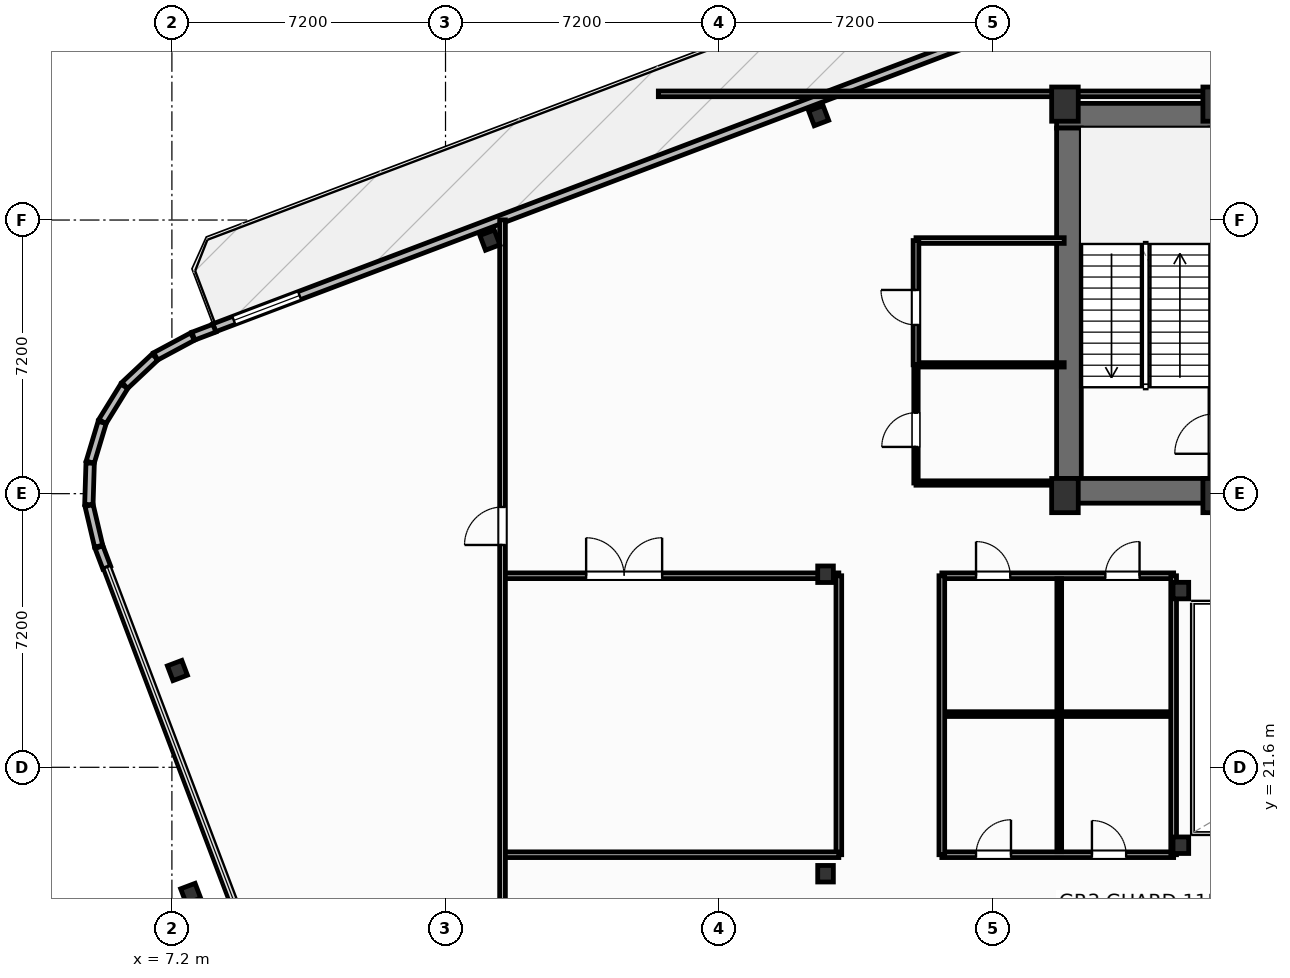
"""IFC4 building model, lengths in metres.
Left out: names, types, materials, properties, quantities, classifications, styles, units other than length and angle.
Written with IfcOpenShell. Run it as: python <this file> out.ifc"""

import sys

from ifc_helpers import new_model, si_unit, direction, frame, frame_2d, origin, origin_2d, place, context, subcontext, project, spatial, rectangle, i_section, extrude, element, fill, save


model = new_model("IFC4")
c1 = context("Model", 3, precision=1e-05, world=origin(), true_north=direction((0.0, 1.0)))
c2 = subcontext(c1, "Body", "Model", "MODEL_VIEW")
j1 = project(units=[si_unit("LENGTHUNIT", "METRE"), si_unit("PLANEANGLEUNIT", "RADIAN")], contexts=[c1])
p1 = place(None, origin())
s1 = spatial("IfcSite", under=j1, at=p1, CompositionType="ELEMENT")
p2 = place(p1, origin())
s2 = spatial("IfcBuilding", under=s1, at=p2, CompositionType="ELEMENT")
p3 = place(p2, frame((0.0, 0.0, 207.9)))
s3 = spatial("IfcBuildingStorey", under=s2, at=p3, CompositionType="ELEMENT", Elevation=207.9)
for number, where, z_axis, x_axis in (
    (1, (30.7, 28.75, 0.0), (0.0, 0.0, 1.0), (1.0, 0.0, 0.0)),
    (2, (34.68, 28.75, 0.0), (0.0, 0.0, 1.0), (1.0, 0.0, 0.0)),
    (3, (30.7, 39.05, 0.0), (0.0, 0.0, 1.0), (1.0, 0.0, 0.0)),
    (4, (34.68, 39.05, 0.0), (0.0, 0.0, 1.0), (1.0, 0.0, 0.0)),
):
    element("IfcColumn", number, at=place(p3, frame(where, z_axis=z_axis, x_axis=x_axis)), inside=s3, PredefinedType="COLUMN", context=c2, shape_type="SweptSolid", body=[
        extrude(rectangle(XDim=0.7, YDim=0.9, at=origin_2d()), origin(), (0.0, 0.0, 1.0), 4.8),
    ])
for number, where, z_axis, x_axis in (
    (5, (33.75, 19.55, 0.0), (0.0, 0.0, 1.0), (1.0, 0.0, 0.0)),
    (6, (33.75, 26.25, 0.0), (0.0, 0.0, 1.0), (1.0, 0.0, 0.0)),
    (7, (24.4, 18.8, 0.0), (0.0, 0.0, 1.0), (1.0, 0.0, 0.0)),
    (8, (24.4, 26.68, 0.0), (0.0, 0.0, 1.0), (1.0, 0.0, 0.0)),
):
    element("IfcColumn", number, at=place(p3, frame(where, z_axis=z_axis, x_axis=x_axis)), inside=s3, PredefinedType="COLUMN", context=c2, shape_type="SweptSolid", body=[
        extrude(i_section(OverallWidth=0.412, OverallDepth=0.435, WebThickness=0.036, FlangeThickness=0.057, FilletRadius=0.025, at=origin_2d()), origin(), (0.0, 0.0, 1.0), 4.8),
    ])
p4 = place(p3, frame((30.48, 38.745, 0.0), z_axis=(0.0, 0.0, 1.0), x_axis=(1.0, 0.0, 0.0)))
e9 = element("IfcWall", 9, at=p4, inside=s3, PredefinedType="SHEAR", context=c2, shape_type="SweptSolid", body=[
    extrude(rectangle(XDim=17.44, YDim=0.65, at=frame_2d((8.72, 0.0))), origin(), (0.0, 0.0, 1.0), 4.55),
])
p5 = place(p3, frame((30.805, 29.2, 0.0), z_axis=(0.0, 0.0, 1.0), x_axis=(0.0, 1.0, 0.0)))
e10 = element("IfcWall", 10, at=p5, inside=s3, PredefinedType="SHEAR", context=c2, shape_type="SweptSolid", body=[
    extrude(rectangle(XDim=9.22, YDim=0.65, at=frame_2d((4.61, 0.0))), origin(), (0.0, 0.0, 1.0), 4.55),
])
p6 = place(p3, frame((30.48, 28.875, 0.0), z_axis=(0.0, 0.0, 1.0), x_axis=(1.0, 0.0, 0.0)))
e11 = element("IfcWall", 11, at=p6, inside=s3, PredefinedType="SHEAR", context=c2, shape_type="SweptSolid", body=[
    extrude(rectangle(XDim=4.32, YDim=0.65, at=frame_2d((2.16, 0.0))), origin(), (0.0, 0.0, 1.0), 4.55),
])
p7 = place(p3, frame((34.64, 29.2, 0.0), z_axis=(0.0, 0.0, 1.0), x_axis=(0.0, 1.0, 0.0)))
e12 = element("IfcWall", 12, at=p7, inside=s3, PredefinedType="SHEAR", context=c2, shape_type="SweptSolid", body=[
    extrude(rectangle(XDim=9.22, YDim=0.25, at=frame_2d((4.61, 0.0))), origin(), (0.0, 0.0, 1.0), 4.55),
])
p8 = place(p7, frame((0.65, 0.0, 0.0)))
e13 = element("IfcOpeningElement", 13, at=p8, cuts=e12, PredefinedType="OPENING", context=c2, shape_type="SweptSolid", body=[
    extrude(rectangle(XDim=1.05, YDim=2.15, at=frame_2d((0.525, 1.075))), frame((0.0, 0.135, 0.0), z_axis=(0.0, -1.0, 0.0), x_axis=(1.0, 0.0, 0.0)), (0.0, 0.0, 1.0), 0.27),
])
for number, where, z_axis, x_axis in (
    (14, (24.219, 38.747, -0.32), (0.0, 0.0, 1.0), (0.935, 0.354, 0.0)),
    (15, (15.568, 35.472, -0.32), (0.0, 0.0, 1.0), (0.935, 0.354, 0.0)),
    (16, (7.345, 24.146, -0.32), (0.0, 0.0, 1.0), (0.935, 0.354, 0.0)),
    (17, (7.695, 18.281, -0.32), (0.0, 0.0, 1.0), (0.935, 0.354, 0.0)),
):
    element("IfcColumn", number, at=place(p3, frame(where, z_axis=z_axis, x_axis=x_axis)), inside=s3, PredefinedType="COLUMN", context=c2, shape_type="SweptSolid", body=[
        extrude(i_section(OverallWidth=0.406, OverallDepth=0.416, WebThickness=0.03, FlangeThickness=0.048, FilletRadius=0.025, at=origin_2d()), origin(), (0.0, 0.0, 1.0), 5.12),
    ])
p9 = place(p3, frame((8.315, 33.164, 0.0), z_axis=(0.0, 0.0, 1.0), x_axis=(0.935222646765, 0.354060165759, 0.0)))
e18 = element("IfcWall", 18, at=p9, inside=s3, PredefinedType="SOLIDWALL", context=c2, shape_type="SweptSolid", body=[
    extrude(rectangle(XDim=52.2, YDim=0.22, at=frame_2d((26.1, 0.0))), origin(), (0.0, 0.0, 1.0), 3.83),
])
p10 = place(p9, frame((23.64, 0.0, 0.0)))
e19 = element("IfcOpeningElement", 19, at=p10, cuts=e18, PredefinedType="OPENING", context=c2, shape_type="SweptSolid", body=[
    extrude(rectangle(XDim=1.85, YDim=2.3, at=frame_2d((0.925, 1.15))), frame((0.0, 0.12, 0.0), z_axis=(0.0, -1.0, 0.0), x_axis=(1.0, 0.0, 0.0)), (0.0, 0.0, 1.0), 0.24),
])
p11 = place(p9, frame((0.55, 0.0, 0.75)))
e20 = element("IfcOpeningElement", 20, at=p11, cuts=e18, PredefinedType="OPENING", context=c2, shape_type="SweptSolid", body=[
    extrude(rectangle(XDim=1.85, YDim=1.75, at=frame_2d((0.925, 0.875))), frame((0.0, 0.12, 0.0), z_axis=(0.0, -1.0, 0.0), x_axis=(1.0, 0.0, 0.0)), (0.0, 0.0, 1.0), 0.24),
])
p12 = place(p9, frame((49.8, 0.0, 0.75)))
e21 = element("IfcOpeningElement", 21, at=p12, cuts=e18, PredefinedType="OPENING", context=c2, shape_type="SweptSolid", body=[
    extrude(rectangle(XDim=1.85, YDim=1.75, at=frame_2d((0.925, 0.875))), frame((0.0, 0.12, 0.0), z_axis=(0.0, -1.0, 0.0), x_axis=(1.0, 0.0, 0.0)), (0.0, 0.0, 1.0), 0.24),
])
p13 = place(p3, frame((8.319, 33.155, 0.0), z_axis=(0.0, 0.0, 1.0), x_axis=(-0.935359991553, -0.353697167365, 0.0)))
e22 = element("IfcWall", 22, at=p13, inside=s3, PredefinedType="SOLIDWALL", context=c2, shape_type="SweptSolid", body=[
    extrude(rectangle(XDim=0.592, YDim=0.22, at=frame_2d((0.296, 0.0))), origin(), (0.0, 0.0, 1.0), 3.83),
])
p14 = place(p3, frame((7.743, 32.933, 0.0), z_axis=(0.0, 0.0, 1.0), x_axis=(-0.881040688262, -0.473040490473, 0.0)))
e23 = element("IfcWall", 23, at=p14, inside=s3, PredefinedType="SOLIDWALL", context=c2, shape_type="SweptSolid", body=[
    extrude(rectangle(XDim=1.1, YDim=0.22, at=frame_2d((0.55, 0.0))), origin(), (0.0, 0.0, 1.0), 3.83),
])
for number, where, z_axis, x_axis in (
    (24, (6.755, 32.396, 0.0), (0.0, 0.0, 1.0), (-0.729, -0.685, 0.0)),
    (25, (5.947, 31.626, 0.0), (0.0, 0.0, 1.0), (-0.526, -0.85, 0.0)),
    (26, (5.365, 30.674, 0.0), (0.0, 0.0, 1.0), (-0.288, -0.958, 0.0)),
    (27, (5.049, 29.604, 0.0), (0.0, 0.0, 1.0), (-0.031, -1.0, 0.0)),
):
    element("IfcWall", number, at=place(p3, frame(where, z_axis=z_axis, x_axis=x_axis)), inside=s3, PredefinedType="SOLIDWALL", context=c2, shape_type="SweptSolid", body=[
        extrude(rectangle(XDim=1.092, YDim=0.22, at=frame_2d((0.546, 0.0))), origin(), (0.0, 0.0, 1.0), 3.83),
    ])
p15 = place(p3, frame((5.021, 28.488, 0.0), z_axis=(0.0, 0.0, 1.0), x_axis=(0.22882902297, -0.973466629241, 0.0)))
e28 = element("IfcWall", 28, at=p15, inside=s3, PredefinedType="SOLIDWALL", context=c2, shape_type="SweptSolid", body=[
    extrude(rectangle(XDim=1.1, YDim=0.22, at=frame_2d((0.55, 0.0))), origin(), (0.0, 0.0, 1.0), 3.83),
])
p16 = place(p3, frame((5.281, 27.394, 0.0), z_axis=(0.0, 0.0, 1.0), x_axis=(0.354042098677, -0.935229486471, 0.0)))
e29 = element("IfcWall", 29, at=p16, inside=s3, PredefinedType="SOLIDWALL", context=c2, shape_type="SweptSolid", body=[
    extrude(rectangle(XDim=0.577, YDim=0.22, at=frame_2d((0.289, 0.0))), origin(), (0.0, 0.0, 1.0), 3.83),
])
p17 = place(p3, frame((27.46, 26.64, 0.0), z_axis=(0.0, 0.0, 1.0), x_axis=(1.0, 0.0, 0.0)))
e30 = element("IfcWall", 30, at=p17, inside=s3, PredefinedType="PARTITIONING", context=c2, shape_type="SweptSolid", body=[
    extrude(rectangle(XDim=6.1, YDim=0.15, at=frame_2d((3.05, 0.0))), origin(), (0.0, 0.0, 1.0), 3.762),
])
p18 = place(p17, frame((0.9, 0.0, 0.0)))
e31 = element("IfcOpeningElement", 31, at=p18, cuts=e30, PredefinedType="OPENING", context=c2, shape_type="SweptSolid", body=[
    extrude(rectangle(XDim=0.9, YDim=2.05, at=frame_2d((0.45, 1.025))), frame((0.0, 0.085, 0.0), z_axis=(0.0, -1.0, 0.0), x_axis=(1.0, 0.0, 0.0)), (0.0, 0.0, 1.0), 0.17),
])
p19 = place(p17, frame((4.303, 0.0, 0.0)))
e32 = element("IfcOpeningElement", 32, at=p19, cuts=e30, PredefinedType="OPENING", context=c2, shape_type="SweptSolid", body=[
    extrude(rectangle(XDim=0.9, YDim=2.05, at=frame_2d((0.45, 1.025))), frame((0.0, 0.085, 0.0), z_axis=(0.0, -1.0, 0.0), x_axis=(1.0, 0.0, 0.0)), (0.0, 0.0, 1.0), 0.17),
])
p20 = place(p3, frame((27.46, 19.3, 0.0), z_axis=(0.0, 0.0, 1.0), x_axis=(1.0, 0.0, 0.0)))
e33 = element("IfcWall", 33, at=p20, inside=s3, PredefinedType="PARTITIONING", context=c2, shape_type="SweptSolid", body=[
    extrude(rectangle(XDim=6.1, YDim=0.15, at=frame_2d((3.05, 0.0))), origin(), (0.0, 0.0, 1.0), 3.762),
])
p21 = place(p20, frame((0.9, 0.0, 0.0)))
e34 = element("IfcOpeningElement", 34, at=p21, cuts=e33, PredefinedType="OPENING", context=c2, shape_type="SweptSolid", body=[
    extrude(rectangle(XDim=0.92, YDim=2.05, at=frame_2d((0.46, 1.025))), frame((0.0, 0.085, 0.0), z_axis=(0.0, -1.0, 0.0), x_axis=(1.0, 0.0, 0.0)), (0.0, 0.0, 1.0), 0.17),
])
p22 = place(p20, frame((3.95, 0.0, 0.0)))
e35 = element("IfcOpeningElement", 35, at=p22, cuts=e33, PredefinedType="OPENING", context=c2, shape_type="SweptSolid", body=[
    extrude(rectangle(XDim=0.9, YDim=2.05, at=frame_2d((0.45, 1.025))), frame((0.0, 0.085, 0.0), z_axis=(0.0, -1.0, 0.0), x_axis=(1.0, 0.0, 0.0)), (0.0, 0.0, 1.0), 0.17),
])
p23 = place(p3, frame((30.55, 19.38, 0.0), z_axis=(0.0, 0.0, 1.0), x_axis=(0.0, 1.0, 0.0)))
e36 = element("IfcWall", 36, at=p23, inside=s3, PredefinedType="PARTITIONING", context=c2, shape_type="SweptSolid", body=[
    extrude(rectangle(XDim=7.18, YDim=0.125, at=frame_2d((3.59, 0.0))), origin(), (0.0, 0.0, 1.0), 4.55),
])
p24 = place(p3, frame((27.52, 23.0, 0.0), z_axis=(0.0, 0.0, 1.0), x_axis=(1.0, 0.0, 0.0)))
e37 = element("IfcWall", 37, at=p24, inside=s3, PredefinedType="PARTITIONING", context=c2, shape_type="SweptSolid", body=[
    extrude(rectangle(XDim=6.0, YDim=0.125, at=frame_2d((3.0, 0.0))), origin(), (0.0, 0.0, 1.0), 4.55),
])
p25 = place(p3, frame((27.46, 19.3, 0.0), z_axis=(0.0, 0.0, 1.0), x_axis=(0.0, 1.0, 0.0)))
e38 = element("IfcWall", 38, at=p25, inside=s3, PredefinedType="PARTITIONING", context=c2, shape_type="SweptSolid", body=[
    extrude(rectangle(XDim=7.34, YDim=0.15, at=frame_2d((3.67, 0.0))), origin(), (0.0, 0.0, 1.0), 4.55),
])
p26 = place(p3, frame((33.56, 19.3, 0.0), z_axis=(0.0, 0.0, 1.0), x_axis=(0.0, 1.0, 0.0)))
e39 = element("IfcWall", 39, at=p26, inside=s3, PredefinedType="PARTITIONING", context=c2, shape_type="SweptSolid", body=[
    extrude(rectangle(XDim=7.34, YDim=0.15, at=frame_2d((3.67, 0.0))), origin(), (0.0, 0.0, 1.0), 3.924),
])
p27 = place(p3, frame((15.9, 26.64, 0.0), z_axis=(0.0, 0.0, 1.0), x_axis=(1.0, 0.0, 0.0)))
e40 = element("IfcWall", 40, at=p27, inside=s3, PredefinedType="PARTITIONING", context=c2, shape_type="SweptSolid", body=[
    extrude(rectangle(XDim=8.85, YDim=0.15, at=frame_2d((4.425, 0.0))), origin(), (0.0, 0.0, 1.0), 3.762),
])
p28 = place(p27, frame((2.2, 0.0, 0.0)))
e41 = element("IfcOpeningElement", 41, at=p28, cuts=e40, PredefinedType="OPENING", context=c2, shape_type="SweptSolid", body=[
    extrude(rectangle(XDim=2.0, YDim=2.05, at=frame_2d((1.0, 1.025))), frame((0.0, 0.085, 0.0), z_axis=(0.0, -1.0, 0.0), x_axis=(1.0, 0.0, 0.0)), (0.0, 0.0, 1.0), 0.17),
])
p29 = place(p3, frame((24.75, 19.3, 0.0), z_axis=(0.0, 0.0, 1.0), x_axis=(0.0, 1.0, 0.0)))
e42 = element("IfcWall", 42, at=p29, inside=s3, PredefinedType="PARTITIONING", context=c2, shape_type="SweptSolid", body=[
    extrude(rectangle(XDim=7.34, YDim=0.15, at=frame_2d((3.67, 0.0))), origin(), (0.0, 0.0, 1.0), 4.55),
])
p30 = place(p3, frame((15.9, 19.3, 0.0), z_axis=(0.0, 0.0, 1.0), x_axis=(1.0, 0.0, 0.0)))
e43 = element("IfcWall", 43, at=p30, inside=s3, PredefinedType="PARTITIONING", context=c2, shape_type="SweptSolid", body=[
    extrude(rectangle(XDim=8.85, YDim=0.15, at=frame_2d((4.425, 0.0))), origin(), (0.0, 0.0, 1.0), 4.55),
])
p31 = place(p3, frame((15.9, 0.25, 0.0), z_axis=(0.0, 0.0, 1.0), x_axis=(0.0, 1.0, 0.0)))
e44 = element("IfcWall", 44, at=p31, inside=s3, PredefinedType="PARTITIONING", context=c2, shape_type="SweptSolid", body=[
    extrude(rectangle(XDim=35.754, YDim=0.15, at=frame_2d((17.877, 0.0))), origin(), (0.0, 0.0, 1.0), 4.55),
])
p32 = place(p31, frame((27.2, 0.0, 0.0)))
e45 = element("IfcOpeningElement", 45, at=p32, cuts=e44, PredefinedType="OPENING", context=c2, shape_type="SweptSolid", body=[
    extrude(rectangle(XDim=1.0, YDim=2.05, at=frame_2d((0.5, 1.025))), frame((0.0, 0.085, 0.0), z_axis=(0.0, -1.0, 0.0), x_axis=(1.0, 0.0, 0.0)), (0.0, 0.0, 1.0), 0.17),
])
p33 = place(p3, frame((20.0, 39.32, 0.0), z_axis=(0.0, 0.0, 1.0), x_axis=(1.0, 0.0, 0.0)))
e46 = element("IfcWall", 46, at=p33, inside=s3, PredefinedType="PARTITIONING", context=c2, shape_type="SweptSolid", body=[
    extrude(rectangle(XDim=40.0, YDim=0.15, at=frame_2d((20.0, 0.0))), origin(), (0.0, 0.0, 1.0), 4.55),
])
p34 = place(p33, frame((31.2, 0.0, 0.0)))
e47 = element("IfcOpeningElement", 47, at=p34, cuts=e46, PredefinedType="OPENING", context=c2, shape_type="SweptSolid", body=[
    extrude(rectangle(XDim=1.0, YDim=2.05, at=frame_2d((0.5, 1.025))), frame((0.0, 0.085, 0.0), z_axis=(0.0, -1.0, 0.0), x_axis=(1.0, 0.0, 0.0)), (0.0, 0.0, 1.0), 0.17),
])
p35 = place(p3, frame((26.8, 32.19, 0.0), z_axis=(0.0, 0.0, 1.0), x_axis=(1.0, 0.0, 0.0)))
e48 = element("IfcWall", 48, at=p35, inside=s3, PredefinedType="PARTITIONING", context=c2, shape_type="SweptSolid", body=[
    extrude(rectangle(XDim=3.88, YDim=0.115, at=frame_2d((1.94, 0.0))), origin(), (0.0, 0.0, 1.0), 4.55),
])
p36 = place(p3, frame((26.78, 29.08, 0.0), z_axis=(0.0, 0.0, 1.0), x_axis=(1.0, 0.0, 0.0)))
e49 = element("IfcWall", 49, at=p36, inside=s3, PredefinedType="PARTITIONING", context=c2, shape_type="SweptSolid", body=[
    extrude(rectangle(XDim=3.7, YDim=0.115, at=frame_2d((1.85, 0.0))), origin(), (0.0, 0.0, 1.0), 4.55),
])
p37 = place(p3, frame((26.78, 35.46, 0.0), z_axis=(0.0, 0.0, 1.0), x_axis=(1.0, 0.0, 0.0)))
e50 = element("IfcWall", 50, at=p37, inside=s3, PredefinedType="PARTITIONING", context=c2, shape_type="SweptSolid", body=[
    extrude(rectangle(XDim=3.9, YDim=0.15, at=frame_2d((1.95, 0.0))), origin(), (0.0, 0.0, 1.0), 4.55),
])
p38 = place(p3, frame((26.78, 29.08, 0.0), z_axis=(0.0, 0.0, 1.0), x_axis=(0.0, 1.0, 0.0)))
e51 = element("IfcWall", 51, at=p38, inside=s3, PredefinedType="PARTITIONING", context=c2, shape_type="SweptSolid", body=[
    extrude(rectangle(XDim=3.11, YDim=0.115, at=frame_2d((1.555, 0.0))), origin(), (0.0, 0.0, 1.0), 4.55),
])
p39 = place(p38, frame((0.95, 0.0, 0.0)))
e52 = element("IfcOpeningElement", 52, at=p39, cuts=e51, PredefinedType="OPENING", context=c2, shape_type="SweptSolid", body=[
    extrude(rectangle(XDim=0.9, YDim=2.05, at=frame_2d((0.45, 1.025))), frame((0.0, 0.067, 0.0), z_axis=(0.0, -1.0, 0.0), x_axis=(1.0, 0.0, 0.0)), (0.0, 0.0, 1.0), 0.135),
])
p40 = place(p3, frame((26.78, 32.19, 0.0), z_axis=(0.0, 0.0, 1.0), x_axis=(0.0, 1.0, 0.0)))
e53 = element("IfcWall", 53, at=p40, inside=s3, PredefinedType="PARTITIONING", context=c2, shape_type="SweptSolid", body=[
    extrude(rectangle(XDim=3.27, YDim=0.15, at=frame_2d((1.635, 0.0))), origin(), (0.0, 0.0, 1.0), 4.55),
])
p41 = place(p40, frame((1.05, 0.0, 0.0)))
e54 = element("IfcOpeningElement", 54, at=p41, cuts=e53, PredefinedType="OPENING", context=c2, shape_type="SweptSolid", body=[
    extrude(rectangle(XDim=0.92, YDim=2.05, at=frame_2d((0.46, 1.025))), frame((0.0, 0.085, 0.0), z_axis=(0.0, -1.0, 0.0), x_axis=(1.0, 0.0, 0.0)), (0.0, 0.0, 1.0), 0.17),
])
p42 = place(p11, origin())
e55 = element("IfcWindow", 55, at=p42, inside=s3, PartitioningType="SINGLE_PANEL", PredefinedType="WINDOW", context=c2, shape_type="SweptSolid", body=[
    extrude(rectangle(XDim=1.85, YDim=1.75, at=frame_2d((0.925, 0.875))), frame((0.0, 0.03, 0.0), z_axis=(0.0, -1.0, 0.0), x_axis=(1.0, 0.0, 0.0)), (0.0, 0.0, 1.0), 0.06),
])
fill(e20, e55)
p43 = place(p18, origin())
e56 = element("IfcDoor", 56, at=p43, inside=s3, OperationType="SINGLE_SWING_LEFT", PredefinedType="DOOR", context=c2, shape_type="SweptSolid", body=[
    extrude(rectangle(XDim=0.9, YDim=2.05, at=frame_2d((0.45, 1.025))), frame((0.0, 0.025, 0.0), z_axis=(0.0, -1.0, 0.0), x_axis=(1.0, 0.0, 0.0)), (0.0, 0.0, 1.0), 0.05),
])
fill(e31, e56)
p44 = place(p19, origin())
e57 = element("IfcDoor", 57, at=p44, inside=s3, OperationType="SINGLE_SWING_RIGHT", PredefinedType="DOOR", context=c2, shape_type="SweptSolid", body=[
    extrude(rectangle(XDim=0.9, YDim=2.05, at=frame_2d((0.45, 1.025))), frame((0.0, 0.025, 0.0), z_axis=(0.0, -1.0, 0.0), x_axis=(1.0, 0.0, 0.0)), (0.0, 0.0, 1.0), 0.05),
])
fill(e32, e57)
p45 = place(p21, origin())
e58 = element("IfcDoor", 58, at=p45, inside=s3, OperationType="SINGLE_SWING_RIGHT", PredefinedType="DOOR", context=c2, shape_type="SweptSolid", body=[
    extrude(rectangle(XDim=0.92, YDim=2.05, at=frame_2d((0.46, 1.025))), frame((0.0, 0.025, 0.0), z_axis=(0.0, -1.0, 0.0), x_axis=(1.0, 0.0, 0.0)), (0.0, 0.0, 1.0), 0.05),
])
fill(e34, e58)
p46 = place(p22, origin())
e59 = element("IfcDoor", 59, at=p46, inside=s3, OperationType="SINGLE_SWING_LEFT", PredefinedType="DOOR", context=c2, shape_type="SweptSolid", body=[
    extrude(rectangle(XDim=0.9, YDim=2.05, at=frame_2d((0.45, 1.025))), frame((0.0, 0.025, 0.0), z_axis=(0.0, -1.0, 0.0), x_axis=(1.0, 0.0, 0.0)), (0.0, 0.0, 1.0), 0.05),
])
fill(e35, e59)
p47 = place(p28, origin())
e60 = element("IfcDoor", 60, at=p47, inside=s3, OperationType="DOUBLE_DOOR_SINGLE_SWING", PredefinedType="DOOR", context=c2, shape_type="SweptSolid", body=[
    extrude(rectangle(XDim=2.0, YDim=2.05, at=frame_2d((1.0, 1.025))), frame((0.0, 0.025, 0.0), z_axis=(0.0, -1.0, 0.0), x_axis=(1.0, 0.0, 0.0)), (0.0, 0.0, 1.0), 0.05),
])
fill(e41, e60)
p48 = place(p32, origin())
e61 = element("IfcDoor", 61, at=p48, inside=s3, OperationType="SINGLE_SWING_LEFT", PredefinedType="DOOR", context=c2, shape_type="SweptSolid", body=[
    extrude(rectangle(XDim=1.0, YDim=2.05, at=frame_2d((0.5, 1.025))), frame((0.0, 0.025, 0.0), z_axis=(0.0, -1.0, 0.0), x_axis=(1.0, 0.0, 0.0)), (0.0, 0.0, 1.0), 0.05),
])
fill(e45, e61)
p49 = place(p39, origin())
e62 = element("IfcDoor", 62, at=p49, inside=s3, OperationType="SINGLE_SWING_LEFT", PredefinedType="DOOR", context=c2, shape_type="SweptSolid", body=[
    extrude(rectangle(XDim=0.9, YDim=2.05, at=frame_2d((0.45, 1.025))), frame((0.0, 0.025, 0.0), z_axis=(0.0, -1.0, 0.0), x_axis=(1.0, 0.0, 0.0)), (0.0, 0.0, 1.0), 0.05),
])
fill(e52, e62)
p50 = place(p41, origin())
e63 = element("IfcDoor", 63, at=p50, inside=s3, OperationType="SINGLE_SWING_RIGHT", PredefinedType="DOOR", context=c2, shape_type="SweptSolid", body=[
    extrude(rectangle(XDim=0.92, YDim=2.05, at=frame_2d((0.46, 1.025))), frame((0.0, 0.025, 0.0), z_axis=(0.0, -1.0, 0.0), x_axis=(1.0, 0.0, 0.0)), (0.0, 0.0, 1.0), 0.05),
])
fill(e54, e63)
save(model, sys.argv[1])
